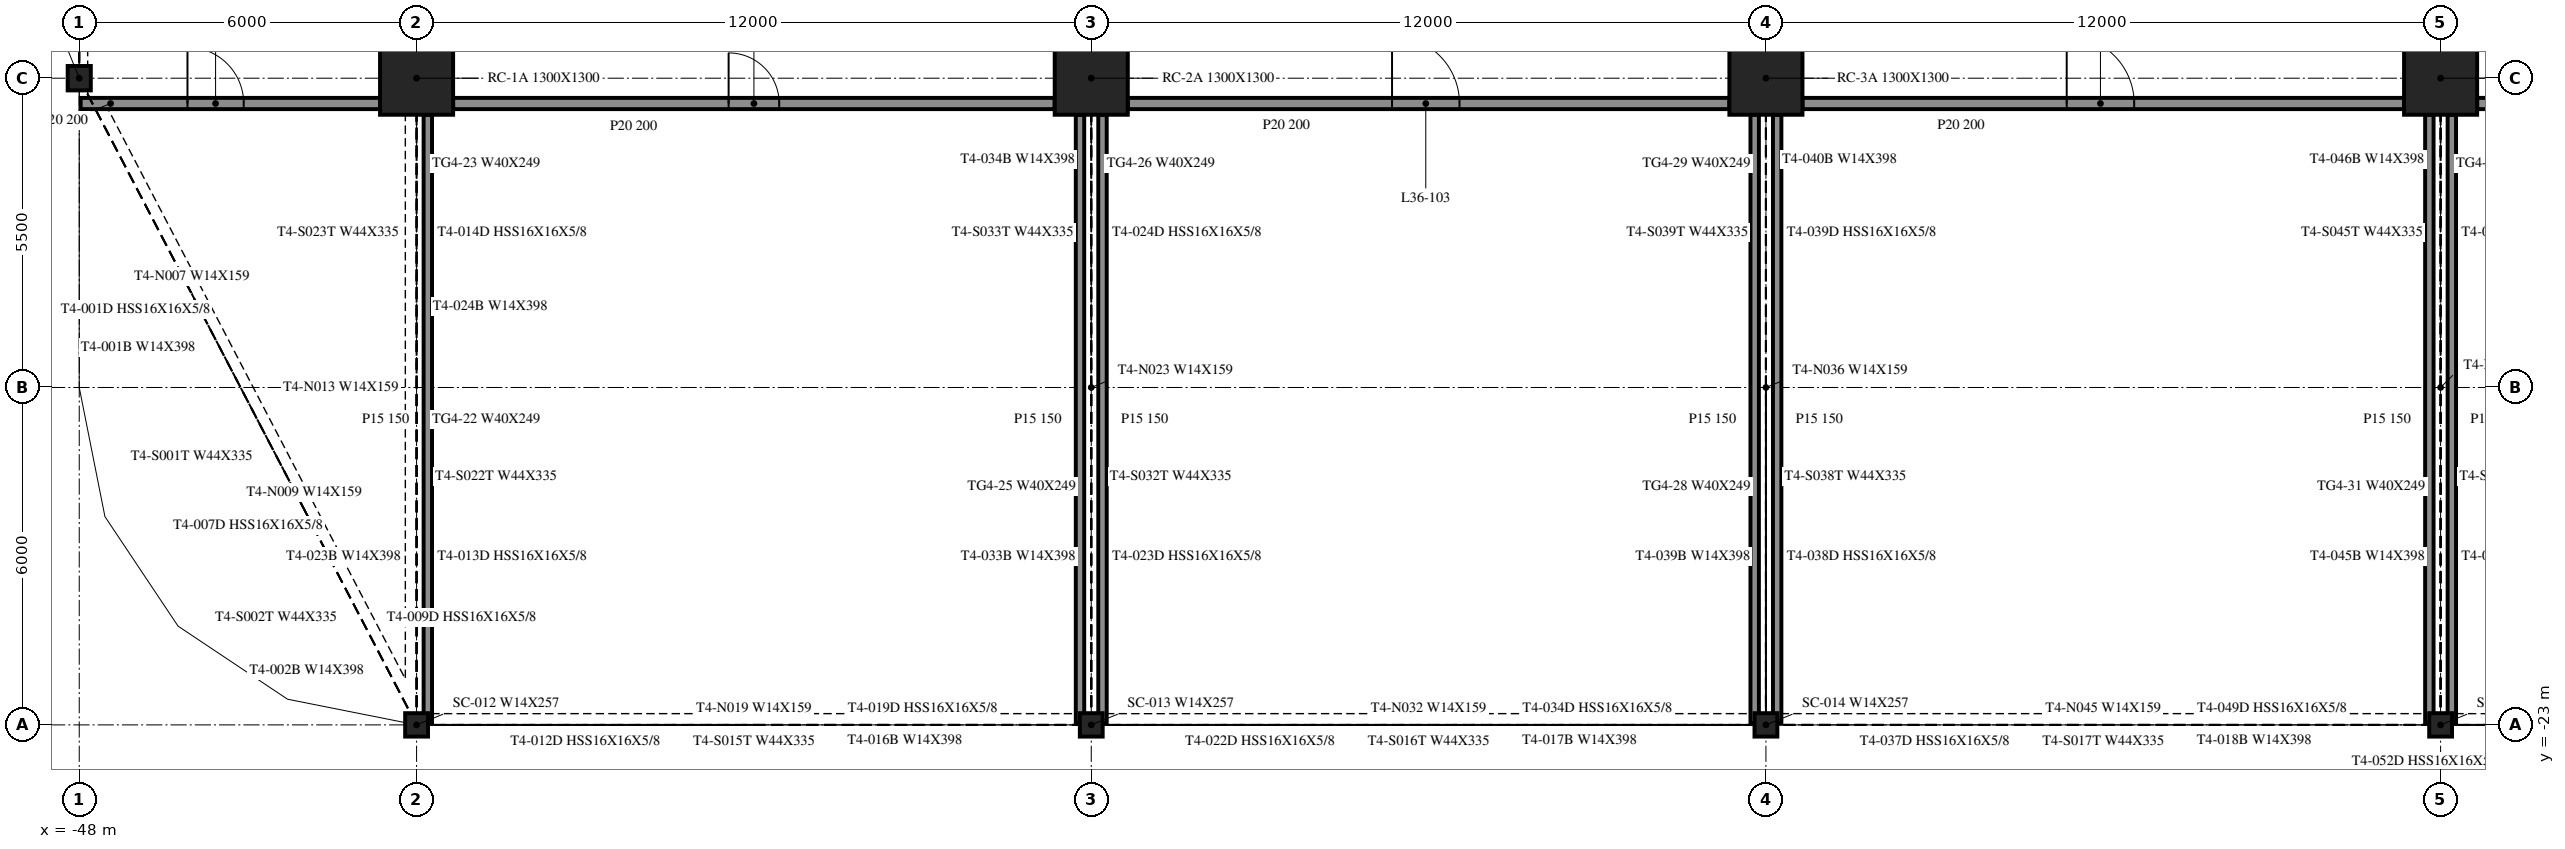
"""IFC4 building model, lengths in metres.
Left out: names, types, materials, properties, quantities, classifications, styles, units other than length and angle.
Written with IfcOpenShell. Run it as: python <this file> out.ifc"""

import sys

from ifc_helpers import new_model, si_unit, direction, frame, frame_2d, origin, origin_2d, place, context, subcontext, project, spatial, rectangle, i_section, extrude, element, fill, save


model = new_model("IFC4")
c1 = context("Model", 3, precision=1e-05, world=origin(), true_north=direction((0.0, 1.0)))
c2 = subcontext(c1, "Body", "Model", "MODEL_VIEW")
j1 = project(units=[si_unit("LENGTHUNIT", "METRE"), si_unit("PLANEANGLEUNIT", "RADIAN")], contexts=[c1])
p1 = place(None, origin())
s1 = spatial("IfcSite", under=j1, at=p1, CompositionType="ELEMENT")
p2 = place(p1, origin())
s2 = spatial("IfcBuilding", under=s1, at=p2, CompositionType="ELEMENT")
p3 = place(p2, frame((0.0, 0.0, 154.8)))
s3 = spatial("IfcBuildingStorey", under=s2, at=p3, CompositionType="ELEMENT", Elevation=154.8)
for number, where, z_axis, x_axis in (
    (1, (-42.0, -11.5, -0.55), (0.0, 0.0, 1.0), (1.0, 0.0, 0.0)),
    (2, (-30.0, -11.5, -0.55), (0.0, 0.0, 1.0), (1.0, 0.0, 0.0)),
    (3, (-18.0, -11.5, -0.55), (0.0, 0.0, 1.0), (1.0, 0.0, 0.0)),
    (4, (-6.0, -11.5, -0.55), (0.0, 0.0, 1.0), (1.0, 0.0, 0.0)),
):
    element("IfcColumn", number, at=place(p3, frame(where, z_axis=z_axis, x_axis=x_axis)), inside=s3, PredefinedType="COLUMN", context=c2, shape_type="SweptSolid", body=[
        extrude(rectangle(XDim=1.3, YDim=1.3, at=origin_2d()), origin(), (0.0, 0.0, 1.0), 4.61),
    ])
p4 = place(p3, frame((-48.0, -11.5, -0.55), z_axis=(0.0, 0.0, 1.0), x_axis=(1.0, 0.0, 0.0)))
e5 = element("IfcColumn", 5, at=p4, inside=s3, PredefinedType="COLUMN", context=c2, shape_type="SweptSolid", body=[
    extrude(i_section(OverallWidth=0.412, OverallDepth=0.434, WebThickness=0.036, FlangeThickness=0.057, at=origin_2d()), origin(), (0.0, 0.0, 1.0), 4.61),
])
for number, where, z_axis, x_axis in (
    (6, (-42.0, -23.0, -0.55), (0.0, 0.0, 1.0), (1.0, 0.0, 0.0)),
    (7, (-30.0, -23.0, -0.55), (0.0, 0.0, 1.0), (1.0, 0.0, 0.0)),
    (8, (-18.0, -23.0, -0.55), (0.0, 0.0, 1.0), (1.0, 0.0, 0.0)),
    (9, (-6.0, -23.0, -0.55), (0.0, 0.0, 1.0), (1.0, 0.0, 0.0)),
):
    element("IfcColumn", number, at=place(p3, frame(where, z_axis=z_axis, x_axis=x_axis)), inside=s3, PredefinedType="COLUMN", context=c2, shape_type="SweptSolid", body=[
        extrude(i_section(OverallWidth=0.406, OverallDepth=0.417, WebThickness=0.03, FlangeThickness=0.048, at=origin_2d()), origin(), (0.0, 0.0, 1.0), 4.61),
    ])
p5 = place(p3, frame((-47.975, -11.95, 0.0), z_axis=(0.0, 0.0, 1.0), x_axis=(1.0, 0.0, 0.0)))
e10 = element("IfcWall", 10, at=p5, inside=s3, PredefinedType="PARTITIONING", context=c2, shape_type="SweptSolid", body=[
    extrude(rectangle(XDim=5.325, YDim=0.2, at=frame_2d((2.663, 0.0))), origin(), (0.0, 0.0, 1.0), 4.06),
])
p6 = place(p5, frame((1.9, 0.0, 0.0)))
e11 = element("IfcOpeningElement", 11, at=p6, cuts=e10, PredefinedType="OPENING", context=c2, shape_type="SweptSolid", body=[
    extrude(rectangle(XDim=1.0, YDim=2.1, at=frame_2d((0.5, 1.05))), frame((0.0, 0.11, 0.0), z_axis=(0.0, -1.0, 0.0), x_axis=(1.0, 0.0, 0.0)), (0.0, 0.0, 1.0), 0.22),
])
p7 = place(p3, frame((-41.35, -11.95, 0.0), z_axis=(0.0, 0.0, 1.0), x_axis=(1.0, 0.0, 0.0)))
e12 = element("IfcWall", 12, at=p7, inside=s3, PredefinedType="PARTITIONING", context=c2, shape_type="SweptSolid", body=[
    extrude(rectangle(XDim=10.7, YDim=0.2, at=frame_2d((5.35, 0.0))), origin(), (0.0, 0.0, 1.0), 4.06),
])
p8 = place(p7, frame((4.9, 0.0, 0.0)))
e13 = element("IfcOpeningElement", 13, at=p8, cuts=e12, PredefinedType="OPENING", context=c2, shape_type="SweptSolid", body=[
    extrude(rectangle(XDim=0.9, YDim=2.1, at=frame_2d((0.45, 1.05))), frame((0.0, 0.11, 0.0), z_axis=(0.0, -1.0, 0.0), x_axis=(1.0, 0.0, 0.0)), (0.0, 0.0, 1.0), 0.22),
])
p9 = place(p3, frame((-29.35, -11.95, 0.0), z_axis=(0.0, 0.0, 1.0), x_axis=(1.0, 0.0, 0.0)))
e14 = element("IfcWall", 14, at=p9, inside=s3, PredefinedType="PARTITIONING", context=c2, shape_type="SweptSolid", body=[
    extrude(rectangle(XDim=10.7, YDim=0.2, at=frame_2d((5.35, 0.0))), origin(), (0.0, 0.0, 1.0), 4.06),
])
p10 = place(p9, frame((4.7, 0.0, 0.0)))
e15 = element("IfcOpeningElement", 15, at=p10, cuts=e14, PredefinedType="OPENING", context=c2, shape_type="SweptSolid", body=[
    extrude(rectangle(XDim=1.2, YDim=2.1, at=frame_2d((0.6, 1.05))), frame((0.0, 0.11, 0.0), z_axis=(0.0, -1.0, 0.0), x_axis=(1.0, 0.0, 0.0)), (0.0, 0.0, 1.0), 0.22),
])
p11 = place(p3, frame((-17.35, -11.95, 0.0), z_axis=(0.0, 0.0, 1.0), x_axis=(1.0, 0.0, 0.0)))
e16 = element("IfcWall", 16, at=p11, inside=s3, PredefinedType="PARTITIONING", context=c2, shape_type="SweptSolid", body=[
    extrude(rectangle(XDim=10.7, YDim=0.2, at=frame_2d((5.35, 0.0))), origin(), (0.0, 0.0, 1.0), 4.06),
])
p12 = place(p11, frame((4.7, 0.0, 0.0)))
e17 = element("IfcOpeningElement", 17, at=p12, cuts=e16, PredefinedType="OPENING", context=c2, shape_type="SweptSolid", body=[
    extrude(rectangle(XDim=1.2, YDim=2.1, at=frame_2d((0.6, 1.05))), frame((0.0, 0.11, 0.0), z_axis=(0.0, -1.0, 0.0), x_axis=(1.0, 0.0, 0.0)), (0.0, 0.0, 1.0), 0.22),
])
p13 = place(p3, frame((-5.35, -11.95, 0.0), z_axis=(0.0, 0.0, 1.0), x_axis=(1.0, 0.0, 0.0)))
e18 = element("IfcWall", 18, at=p13, inside=s3, PredefinedType="PARTITIONING", context=c2, shape_type="SweptSolid", body=[
    extrude(rectangle(XDim=10.7, YDim=0.2, at=frame_2d((5.35, 0.0))), origin(), (0.0, 0.0, 1.0), 4.06),
])
p14 = place(p13, frame((4.7, 0.0, 0.0)))
e19 = element("IfcOpeningElement", 19, at=p14, cuts=e18, PredefinedType="OPENING", context=c2, shape_type="SweptSolid", body=[
    extrude(rectangle(XDim=1.2, YDim=2.1, at=frame_2d((0.6, 1.05))), frame((0.0, 0.11, 0.0), z_axis=(0.0, -1.0, 0.0), x_axis=(1.0, 0.0, 0.0)), (0.0, 0.0, 1.0), 0.22),
])
for number, where, z_axis, x_axis in (
    (20, (-41.8, -22.975, 0.0), (0.0, 0.0, 1.0), (0.0, 1.0, 0.0)),
    (21, (-30.2, -22.975, 0.0), (0.0, 0.0, 1.0), (0.0, 1.0, 0.0)),
    (22, (-29.8, -22.975, 0.0), (0.0, 0.0, 1.0), (0.0, 1.0, 0.0)),
    (23, (-18.2, -22.975, 0.0), (0.0, 0.0, 1.0), (0.0, 1.0, 0.0)),
    (24, (-17.8, -22.975, 0.0), (0.0, 0.0, 1.0), (0.0, 1.0, 0.0)),
    (25, (-6.2, -22.975, 0.0), (0.0, 0.0, 1.0), (0.0, 1.0, 0.0)),
    (26, (-5.8, -22.975, 0.0), (0.0, 0.0, 1.0), (0.0, 1.0, 0.0)),
):
    element("IfcWall", number, at=place(p3, frame(where, z_axis=z_axis, x_axis=x_axis)), inside=s3, PredefinedType="PARTITIONING", context=c2, shape_type="SweptSolid", body=[
        extrude(rectangle(XDim=10.825, YDim=0.15, at=frame_2d((5.413, 0.0))), origin(), (0.0, 0.0, 1.0), 4.06),
    ])
p15 = place(p6, origin())
e27 = element("IfcDoor", 27, at=p15, inside=s3, OperationType="SINGLE_SWING_RIGHT", PredefinedType="DOOR", context=c2, shape_type="SweptSolid", body=[
    extrude(rectangle(XDim=1.0, YDim=2.1, at=frame_2d((0.5, 1.05))), frame((0.0, 0.025, 0.0), z_axis=(0.0, -1.0, 0.0), x_axis=(1.0, 0.0, 0.0)), (0.0, 0.0, 1.0), 0.05),
])
fill(e11, e27)
p16 = place(p8, origin())
e28 = element("IfcDoor", 28, at=p16, inside=s3, OperationType="SINGLE_SWING_RIGHT", PredefinedType="DOOR", context=c2, shape_type="SweptSolid", body=[
    extrude(rectangle(XDim=0.9, YDim=2.1, at=frame_2d((0.45, 1.05))), frame((0.0, 0.025, 0.0), z_axis=(0.0, -1.0, 0.0), x_axis=(1.0, 0.0, 0.0)), (0.0, 0.0, 1.0), 0.05),
])
fill(e13, e28)
p17 = place(p10, origin())
e29 = element("IfcDoor", 29, at=p17, inside=s3, OperationType="SINGLE_SWING_RIGHT", PredefinedType="DOOR", context=c2, shape_type="SweptSolid", body=[
    extrude(rectangle(XDim=1.2, YDim=2.1, at=frame_2d((0.6, 1.05))), frame((0.0, 0.025, 0.0), z_axis=(0.0, -1.0, 0.0), x_axis=(1.0, 0.0, 0.0)), (0.0, 0.0, 1.0), 0.05),
])
fill(e15, e29)
p18 = place(p12, origin())
e30 = element("IfcDoor", 30, at=p18, inside=s3, OperationType="SINGLE_SWING_RIGHT", PredefinedType="DOOR", context=c2, shape_type="SweptSolid", body=[
    extrude(rectangle(XDim=1.2, YDim=2.1, at=frame_2d((0.6, 1.05))), frame((0.0, 0.025, 0.0), z_axis=(0.0, -1.0, 0.0), x_axis=(1.0, 0.0, 0.0)), (0.0, 0.0, 1.0), 0.05),
])
fill(e17, e30)
save(model, sys.argv[1])
